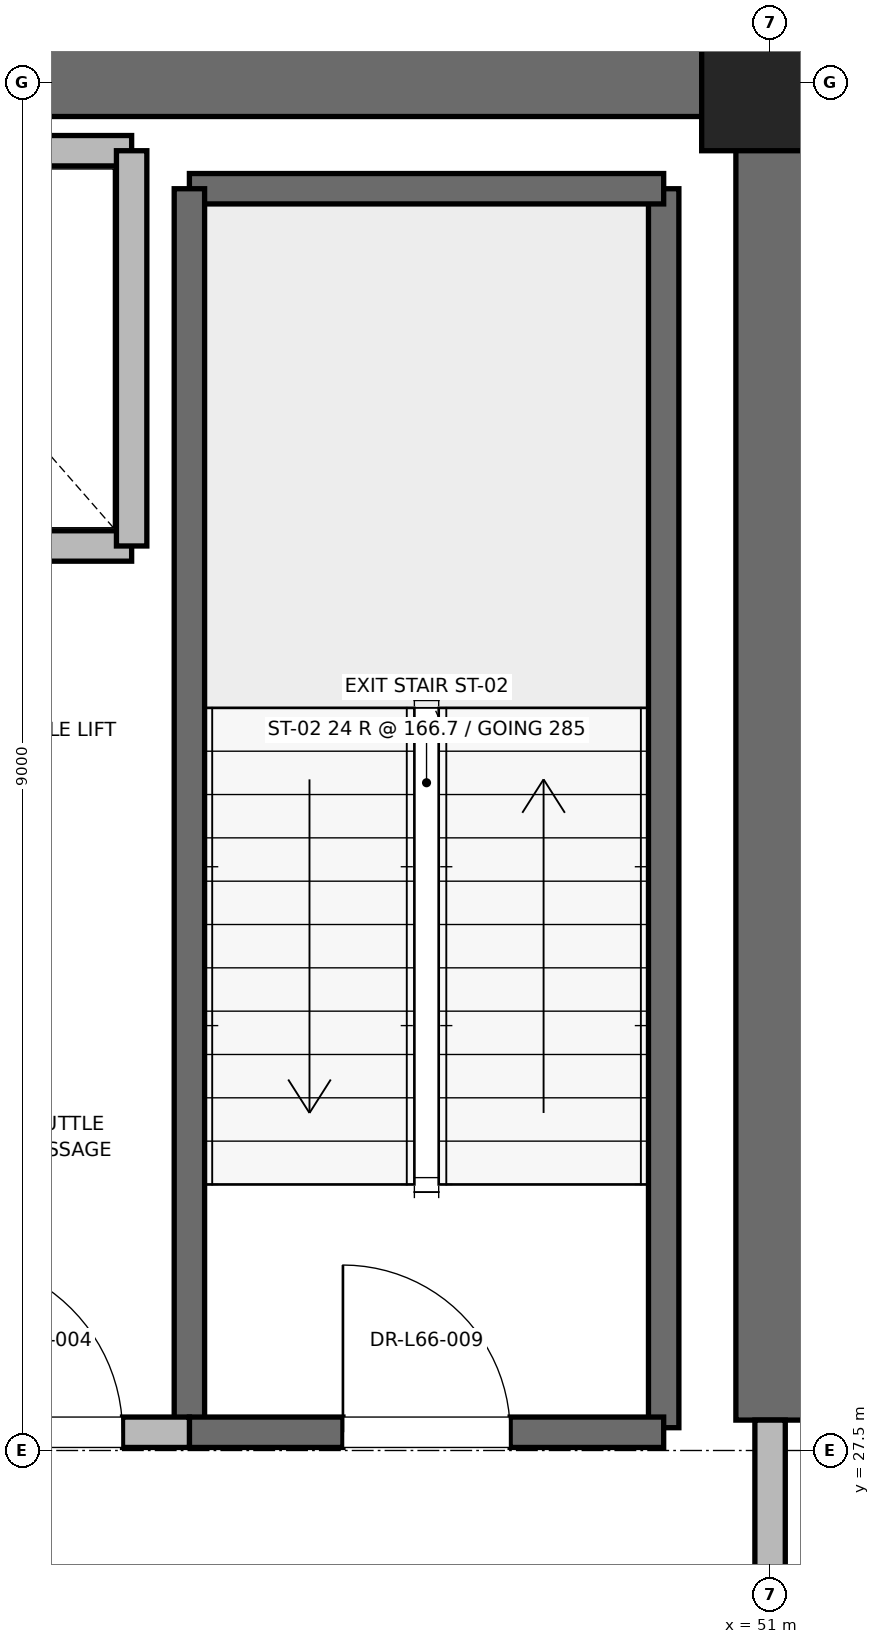
"""IFC4 building model, lengths in metres.
Left out: names, types, materials, properties, quantities, classifications, styles, units other than length and angle.
Written with IfcOpenShell. Run it as: python <this file> out.ifc"""

import sys

from ifc_helpers import new_model, si_unit, direction, frame, frame_2d, origin, origin_2d, place, context, subcontext, project, spatial, rectangle, extrude, element, fill, save


model = new_model("IFC4")
c1 = context("Model", 3, precision=1e-05, world=origin(), true_north=direction((0.0, 1.0)))
c2 = subcontext(c1, "Body", "Model", "MODEL_VIEW")
j1 = project(units=[si_unit("LENGTHUNIT", "METRE"), si_unit("PLANEANGLEUNIT", "RADIAN")], contexts=[c1])
p1 = place(None, origin())
s1 = spatial("IfcSite", under=j1, at=p1, CompositionType="ELEMENT")
p2 = place(p1, origin())
s2 = spatial("IfcBuilding", under=s1, at=p2, CompositionType="ELEMENT")
p3 = place(p2, frame((0.0, 0.0, 283.2)))
s3 = spatial("IfcBuildingStorey", under=s2, at=p3, CompositionType="ELEMENT", Elevation=283.2)
p4 = place(p3, frame((51.0, 36.5, 0.0), z_axis=(0.0, 0.0, 1.0), x_axis=(1.0, 0.0, 0.0)))
e1 = element("IfcColumn", 1, at=p4, inside=s3, PredefinedType="PILASTER", context=c2, shape_type="SweptSolid", body=[
    extrude(rectangle(XDim=0.9, YDim=0.9, at=origin_2d()), origin(), (0.0, 0.0, 1.0), 4.0),
])
p5 = place(p3, frame((45.2, 36.5, 0.0), z_axis=(0.0, 0.0, 1.0), x_axis=(1.0, 0.0, 0.0)))
e2 = element("IfcWall", 2, at=p5, inside=s3, PredefinedType="SHEAR", context=c2, shape_type="SweptSolid", body=[
    extrude(rectangle(XDim=5.8, YDim=0.45, at=frame_2d((2.9, 0.0))), origin(), (0.0, 0.0, 1.0), 3.785),
])
p6 = place(p3, frame((51.0, 27.7, 0.0), z_axis=(0.0, 0.0, 1.0), x_axis=(0.0, 1.0, 0.0)))
e3 = element("IfcWall", 3, at=p6, inside=s3, PredefinedType="SHEAR", context=c2, shape_type="SweptSolid", body=[
    extrude(rectangle(XDim=8.8, YDim=0.45, at=frame_2d((4.4, 0.0))), origin(), (0.0, 0.0, 1.0), 3.785),
])
p7 = place(p3, frame((50.3, 27.65, 0.0), z_axis=(0.0, 0.0, 1.0), x_axis=(0.0, 1.0, 0.0)))
e4 = element("IfcWall", 4, at=p7, inside=s3, PredefinedType="SOLIDWALL", context=c2, shape_type="SweptSolid", body=[
    extrude(rectangle(XDim=8.15, YDim=0.2, at=frame_2d((4.075, 0.0))), origin(), (0.0, 0.0, 1.0), 3.785),
])
p8 = place(p3, frame((47.18, 35.8, 0.0), z_axis=(0.0, 0.0, 1.0), x_axis=(1.0, 0.0, 0.0)))
e5 = element("IfcWall", 5, at=p8, inside=s3, PredefinedType="SOLIDWALL", context=c2, shape_type="SweptSolid", body=[
    extrude(rectangle(XDim=3.12, YDim=0.2, at=frame_2d((1.56, 0.0))), origin(), (0.0, 0.0, 1.0), 3.785),
])
p9 = place(p3, frame((47.18, 27.62, 0.0), z_axis=(0.0, 0.0, 1.0), x_axis=(0.0, 1.0, 0.0)))
e6 = element("IfcWall", 6, at=p9, inside=s3, PredefinedType="SOLIDWALL", context=c2, shape_type="SweptSolid", body=[
    extrude(rectangle(XDim=8.18, YDim=0.2, at=frame_2d((4.09, 0.0))), origin(), (0.0, 0.0, 1.0), 3.785),
])
p10 = place(p3, frame((47.18, 27.62, 0.0), z_axis=(0.0, 0.0, 1.0), x_axis=(1.0, 0.0, 0.0)))
e7 = element("IfcWall", 7, at=p10, inside=s3, PredefinedType="SOLIDWALL", context=c2, shape_type="SweptSolid", body=[
    extrude(rectangle(XDim=3.12, YDim=0.2, at=frame_2d((1.56, 0.0))), origin(), (0.0, 0.0, 1.0), 3.785),
])
p11 = place(p10, frame((1.01, 0.0, 0.0)))
e8 = element("IfcOpeningElement", 8, at=p11, cuts=e7, PredefinedType="OPENING", context=c2, shape_type="SweptSolid", body=[
    extrude(rectangle(XDim=1.1, YDim=2.15, at=frame_2d((0.55, 1.075))), frame((0.0, 0.1, 0.0), z_axis=(0.0, -1.0, 0.0), x_axis=(1.0, 0.0, 0.0)), (0.0, 0.0, 1.0), 0.2),
])
p12 = place(p3, frame((45.15, 27.62, 0.0), z_axis=(0.0, 0.0, 1.0), x_axis=(1.0, 0.0, 0.0)))
e9 = element("IfcWall", 9, at=p12, inside=s3, PredefinedType="PARTITIONING", context=c2, shape_type="SweptSolid", body=[
    extrude(rectangle(XDim=2.03, YDim=0.2, at=frame_2d((1.015, 0.0))), origin(), (0.0, 0.0, 1.0), 3.785),
])
p13 = place(p12, frame((0.44, 0.0, 0.0)))
e10 = element("IfcOpeningElement", 10, at=p13, cuts=e9, PredefinedType="OPENING", context=c2, shape_type="SweptSolid", body=[
    extrude(rectangle(XDim=1.15, YDim=2.2, at=frame_2d((0.575, 1.1))), frame((0.0, 0.1, 0.0), z_axis=(0.0, -1.0, 0.0), x_axis=(1.0, 0.0, 0.0)), (0.0, 0.0, 1.0), 0.2),
])
p14 = place(p3, frame((51.0, 24.3, 0.0), z_axis=(0.0, 0.0, 1.0), x_axis=(0.0, 1.0, 0.0)))
e11 = element("IfcWall", 11, at=p14, inside=s3, PredefinedType="PARTITIONING", context=c2, shape_type="SweptSolid", body=[
    extrude(rectangle(XDim=3.4, YDim=0.2, at=frame_2d((1.7, 0.0))), origin(), (0.0, 0.0, 1.0), 2.865),
])
p15 = place(p14, frame((1.125, 0.0, 0.0)))
e12 = element("IfcOpeningElement", 12, at=p15, cuts=e11, PredefinedType="OPENING", context=c2, shape_type="SweptSolid", body=[
    extrude(rectangle(XDim=1.15, YDim=2.2, at=frame_2d((0.575, 1.1))), frame((0.0, 0.1, 0.0), z_axis=(0.0, -1.0, 0.0), x_axis=(1.0, 0.0, 0.0)), (0.0, 0.0, 1.0), 0.2),
])
p16 = place(p3, frame((44.5, 33.45, 0.0), z_axis=(0.0, 0.0, 1.0), x_axis=(1.0, 0.0, 0.0)))
e13 = element("IfcWall", 13, at=p16, inside=s3, PredefinedType="SOLIDWALL", context=c2, shape_type="SweptSolid", body=[
    extrude(rectangle(XDim=2.3, YDim=0.2, at=frame_2d((1.15, 0.0))), origin(), (0.0, 0.0, 1.0), 3.785),
])
p17 = place(p3, frame((46.8, 36.05, 0.0), z_axis=(0.0, 0.0, 1.0), x_axis=(-1.0, 0.0, 0.0)))
e14 = element("IfcWall", 14, at=p17, inside=s3, PredefinedType="SOLIDWALL", context=c2, shape_type="SweptSolid", body=[
    extrude(rectangle(XDim=2.3, YDim=0.2, at=frame_2d((1.15, 0.0))), origin(), (0.0, 0.0, 1.0), 2.865),
])
p18 = place(p3, frame((46.8, 33.45, 0.0), z_axis=(0.0, 0.0, 1.0), x_axis=(0.0, 1.0, 0.0)))
e15 = element("IfcWall", 15, at=p18, inside=s3, PredefinedType="SOLIDWALL", context=c2, shape_type="SweptSolid", body=[
    extrude(rectangle(XDim=2.6, YDim=0.2, at=frame_2d((1.3, 0.0))), origin(), (0.0, 0.0, 1.0), 3.785),
])
p19 = place(p11, origin())
e16 = element("IfcDoor", 16, at=p19, inside=s3, OperationType="SINGLE_SWING_LEFT", PredefinedType="DOOR", context=c2, shape_type="SweptSolid", body=[
    extrude(rectangle(XDim=1.1, YDim=2.15, at=frame_2d((0.55, 1.075))), frame((0.0, 0.025, 0.0), z_axis=(0.0, -1.0, 0.0), x_axis=(1.0, 0.0, 0.0)), (0.0, 0.0, 1.0), 0.05),
])
fill(e8, e16)
p20 = place(p13, origin())
e17 = element("IfcDoor", 17, at=p20, inside=s3, OperationType="SINGLE_SWING_LEFT", PredefinedType="DOOR", context=c2, shape_type="SweptSolid", body=[
    extrude(rectangle(XDim=1.15, YDim=2.2, at=frame_2d((0.575, 1.1))), frame((0.0, 0.025, 0.0), z_axis=(0.0, -1.0, 0.0), x_axis=(1.0, 0.0, 0.0)), (0.0, 0.0, 1.0), 0.05),
])
fill(e10, e17)
save(model, sys.argv[1])
